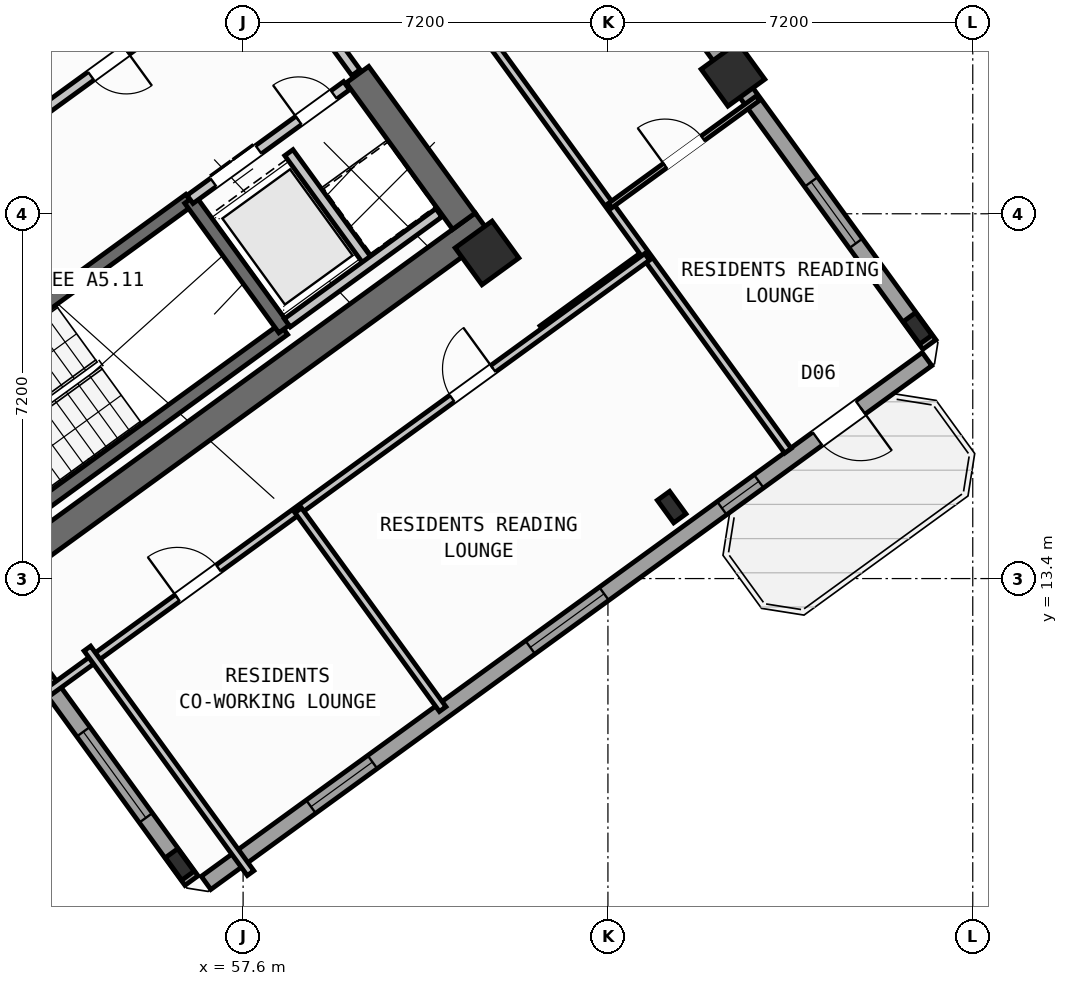
"""IFC4 building model, lengths in metres.
Left out: names, types, materials, properties, quantities, classifications, styles, units other than length and angle.
Written with IfcOpenShell. Run it as: python <this file> out.ifc"""

import sys

from ifc_helpers import new_model, si_unit, direction, frame, frame_2d, origin, origin_2d, place, context, subcontext, project, spatial, rectangle, hollow_rectangle, i_section, extrude, source, transform, mapped, element, fill, save


model = new_model("IFC4")
c1 = context("Model", 3, precision=1e-05, world=origin(), true_north=direction((0.0, 1.0)))
c2 = subcontext(c1, "Body", "Model", "MODEL_VIEW")
j1 = project(units=[si_unit("LENGTHUNIT", "METRE"), si_unit("PLANEANGLEUNIT", "RADIAN")], contexts=[c1])
p1 = place(None, origin())
s1 = spatial("IfcSite", under=j1, at=p1, CompositionType="ELEMENT")
p2 = place(p1, origin())
s2 = spatial("IfcBuilding", under=s1, at=p2, CompositionType="ELEMENT")
p3 = place(p2, frame((0.0, 0.0, 158.7)))
s3 = spatial("IfcBuildingStorey", under=s2, at=p3, CompositionType="ELEMENT", Elevation=158.7)
p4 = place(p3, frame((52.359, 13.14, 0.0), z_axis=(0.0, 0.0, 1.0), x_axis=(0.809014896919, 0.587788139183, 0.0)))
e1 = element("IfcWall", 1, at=p4, inside=s3, PredefinedType="SHEAR", context=c2, shape_type="SweptSolid", body=[
    extrude(rectangle(XDim=12.34, YDim=0.55, at=frame_2d((6.17, 0.0))), origin(), (0.0, 0.0, 1.0), 3.35),
])
p5 = place(p3, frame((61.958, 20.454, 0.0), z_axis=(0.0, 0.0, 1.0), x_axis=(-0.587802113096, 0.809004744015, 0.0)))
e2 = element("IfcWall", 2, at=p5, inside=s3, PredefinedType="SHEAR", context=c2, shape_type="SweptSolid", body=[
    extrude(rectangle(XDim=3.575, YDim=0.55, at=frame_2d((1.788, 0.0))), origin(), (0.0, 0.0, 1.0), 3.35),
])
m1 = source(origin(), c2, "Body", "SweptSolid", [
    extrude(i_section(OverallWidth=0.3, OverallDepth=0.55, WebThickness=0.015, FlangeThickness=0.029, at=origin_2d()), origin(), (0.0, 0.0, 1.0), 3.6),
])
for number, where, z_axis, x_axis in (
    (3, (56.35, 7.758, 0.0), (0.0, 0.0, 1.0), (0.809, 0.588, 0.0)),
    (4, (66.058, 14.811, 0.0), (0.0, 0.0, 1.0), (0.809, 0.588, 0.0)),
):
    element("IfcColumn", number, at=place(p3, frame(where, z_axis=z_axis, x_axis=x_axis)), inside=s3, PredefinedType="COLUMN", context=c2, shape_type="MappedRepresentation", body=[
        mapped(m1, transform((0.0, 0.0, 0.0), scale=1.0)),
    ])
m2 = source(origin(), c2, "Body", "SweptSolid", [
    extrude(hollow_rectangle(XDim=0.9, YDim=0.9, WallThickness=0.036, at=origin_2d()), origin(), (0.0, 0.0, 1.0), 3.6),
])
p6 = place(p3, frame((62.414, 19.827, 0.0), z_axis=(0.0, 0.0, 1.0), x_axis=(0.809016994375, 0.587785252292, 0.0)))
e5 = element("IfcColumn", 5, at=p6, inside=s3, PredefinedType="COLUMN", context=c2, shape_type="MappedRepresentation", body=[
    mapped(m2, transform((0.0, 0.0, 0.0), scale=1.0)),
])
p7 = place(p3, frame((70.912, 18.338, 0.0), z_axis=(0.0, 0.0, 1.0), x_axis=(0.809016994375, 0.587785252292, 0.0)))
e6 = element("IfcColumn", 6, at=p7, inside=s3, PredefinedType="COLUMN", context=c2, shape_type="MappedRepresentation", body=[
    mapped(m1, transform((0.0, 0.0, 0.0), scale=1.0)),
])
p8 = place(p3, frame((67.268, 23.354, 0.0), z_axis=(0.0, 0.0, 1.0), x_axis=(0.809016994375, 0.587785252292, 0.0)))
e7 = element("IfcColumn", 7, at=p8, inside=s3, PredefinedType="COLUMN", context=c2, shape_type="MappedRepresentation", body=[
    mapped(m2, transform((0.0, 0.0, 0.0), scale=1.0)),
])
p9 = place(p3, frame((58.455, 35.484, 0.0), z_axis=(0.0, 0.0, 1.0), x_axis=(0.587783625747, -0.809018176127, 0.0)))
e8 = element("IfcWall", 8, at=p9, inside=s3, PredefinedType="STANDARD", context=c2, shape_type="SweptSolid", body=[
    extrude(rectangle(XDim=21.587, YDim=0.32, at=frame_2d((10.794, 0.0))), origin(), (0.0, 0.0, 1.0), 2.775),
])
p10 = place(p9, frame((1.504, 0.0, 0.85)))
e9 = element("IfcOpeningElement", 9, at=p10, cuts=e8, PredefinedType="OPENING", context=c2, shape_type="SweptSolid", body=[
    extrude(rectangle(XDim=1.8, YDim=1.5, at=frame_2d((0.9, 0.75))), frame((0.0, 0.17, 0.0), z_axis=(0.0, -1.0, 0.0), x_axis=(1.0, 0.0, 0.0)), (0.0, 0.0, 1.0), 0.34),
])
p11 = place(p9, frame((10.444, 0.0, 0.85)))
e10 = element("IfcOpeningElement", 10, at=p11, cuts=e8, PredefinedType="OPENING", context=c2, shape_type="SweptSolid", body=[
    extrude(rectangle(XDim=1.8, YDim=1.5, at=frame_2d((0.9, 0.75))), frame((0.0, 0.17, 0.0), z_axis=(0.0, -1.0, 0.0), x_axis=(1.0, 0.0, 0.0)), (0.0, 0.0, 1.0), 0.34),
])
p12 = place(p9, frame((17.62, 0.0, 0.85)))
e11 = element("IfcOpeningElement", 11, at=p12, cuts=e8, PredefinedType="OPENING", context=c2, shape_type="SweptSolid", body=[
    extrude(rectangle(XDim=1.5, YDim=1.5, at=frame_2d((0.75, 0.75))), frame((0.0, 0.17, 0.0), z_axis=(0.0, -1.0, 0.0), x_axis=(1.0, 0.0, 0.0)), (0.0, 0.0, 1.0), 0.34),
])
p13 = place(p3, frame((71.098, 17.731, 0.0), z_axis=(0.0, 0.0, 1.0), x_axis=(-0.809021120468, -0.587779573171, 0.0)))
e12 = element("IfcWall", 12, at=p13, inside=s3, PredefinedType="STANDARD", context=c2, shape_type="SweptSolid", body=[
    extrude(rectangle(XDim=17.588, YDim=0.32, at=frame_2d((8.794, 0.0))), origin(), (0.0, 0.0, 1.0), 3.35),
])
p14 = place(p13, frame((1.624, 0.0, 0.0)))
e13 = element("IfcOpeningElement", 13, at=p14, cuts=e12, PredefinedType="OPENING", context=c2, shape_type="SweptSolid", body=[
    extrude(rectangle(XDim=1.05, YDim=2.15, at=frame_2d((0.525, 1.075))), frame((0.0, 0.17, 0.0), z_axis=(0.0, -1.0, 0.0), x_axis=(1.0, 0.0, 0.0)), (0.0, 0.0, 1.0), 0.34),
])
p15 = place(p13, frame((4.104, 0.0, 1.0)))
e14 = element("IfcOpeningElement", 14, at=p15, cuts=e12, PredefinedType="OPENING", context=c2, shape_type="SweptSolid", body=[
    extrude(rectangle(XDim=0.9, YDim=1.25, at=frame_2d((0.45, 0.625))), frame((0.0, 0.17, 0.0), z_axis=(0.0, -1.0, 0.0), x_axis=(1.0, 0.0, 0.0)), (0.0, 0.0, 1.0), 0.34),
])
p16 = place(p13, frame((7.879, 0.0, 0.85)))
e15 = element("IfcOpeningElement", 15, at=p16, cuts=e12, PredefinedType="OPENING", context=c2, shape_type="SweptSolid", body=[
    extrude(rectangle(XDim=1.8, YDim=1.5, at=frame_2d((0.9, 0.75))), frame((0.0, 0.17, 0.0), z_axis=(0.0, -1.0, 0.0), x_axis=(1.0, 0.0, 0.0)), (0.0, 0.0, 1.0), 0.34),
])
p17 = place(p13, frame((13.529, 0.0, 0.85)))
e16 = element("IfcOpeningElement", 16, at=p17, cuts=e12, PredefinedType="OPENING", context=c2, shape_type="SweptSolid", body=[
    extrude(rectangle(XDim=1.5, YDim=1.5, at=frame_2d((0.75, 0.75))), frame((0.0, 0.17, 0.0), z_axis=(0.0, -1.0, 0.0), x_axis=(1.0, 0.0, 0.0)), (0.0, 0.0, 1.0), 0.34),
])
p18 = place(p3, frame((56.581, 7.439, 0.0), z_axis=(0.0, 0.0, 1.0), x_axis=(-0.587771678454, 0.809026856172, 0.0)))
e17 = element("IfcWall", 17, at=p18, inside=s3, PredefinedType="STANDARD", context=c2, shape_type="SweptSolid", body=[
    extrude(rectangle(XDim=6.824, YDim=0.32, at=frame_2d((3.412, 0.0))), origin(), (0.0, 0.0, 1.0), 2.775),
])
p19 = place(p18, frame((1.531, 0.0, 0.8)))
e18 = element("IfcOpeningElement", 18, at=p19, cuts=e17, PredefinedType="OPENING", context=c2, shape_type="SweptSolid", body=[
    extrude(rectangle(XDim=2.1, YDim=1.55, at=frame_2d((1.05, 0.775))), frame((0.0, 0.17, 0.0), z_axis=(0.0, -1.0, 0.0), x_axis=(1.0, 0.0, 0.0)), (0.0, 0.0, 1.0), 0.34),
])
p20 = place(p3, frame((49.863, 23.44, 0.0), z_axis=(0.0, 0.0, 1.0), x_axis=(0.809003474932, 0.587803859759, 0.0)))
e19 = element("IfcWall", 19, at=p20, inside=s3, PredefinedType="SHEAR", context=c2, shape_type="SweptSolid", body=[
    extrude(rectangle(XDim=7.46, YDim=0.26, at=frame_2d((3.73, 0.0))), origin(), (0.0, 0.0, 1.0), 3.35),
])
p21 = place(p20, frame((0.36, 0.0, 0.0)))
e20 = element("IfcOpeningElement", 20, at=p21, cuts=e19, PredefinedType="OPENING", context=c2, shape_type="SweptSolid", body=[
    extrude(rectangle(XDim=0.86, YDim=2.05, at=frame_2d((0.43, 1.025))), frame((0.0, 0.14, 0.0), z_axis=(0.0, -1.0, 0.0), x_axis=(1.0, 0.0, 0.0)), (0.0, 0.0, 1.0), 0.28),
])
p22 = place(p3, frame((52.472, 14.013, 0.0), z_axis=(0.0, 0.0, 1.0), x_axis=(0.809028366311, 0.587769599847, 0.0)))
e21 = element("IfcWall", 21, at=p22, inside=s3, PredefinedType="SHEAR", context=c2, shape_type="SweptSolid", body=[
    extrude(rectangle(XDim=7.33, YDim=0.26, at=frame_2d((3.665, 0.0))), origin(), (0.0, 0.0, 1.0), 3.35),
])
p23 = place(p3, frame((50.615, 16.57, 0.0), z_axis=(0.0, 0.0, 1.0), x_axis=(0.809028366311, 0.587769599847, 0.0)))
e22 = element("IfcWall", 22, at=p23, inside=s3, PredefinedType="SHEAR", context=c2, shape_type="SweptSolid", body=[
    extrude(rectangle(XDim=7.33, YDim=0.26, at=frame_2d((3.665, 0.0))), origin(), (0.0, 0.0, 1.0), 3.35),
])
p24 = place(p23, frame((0.22, 0.0, 0.0)))
e23 = element("IfcOpeningElement", 23, at=p24, cuts=e22, PredefinedType="OPENING", context=c2, shape_type="SweptSolid", body=[
    extrude(rectangle(XDim=1.1, YDim=2.1, at=frame_2d((0.55, 1.05))), frame((0.0, 0.14, 0.0), z_axis=(0.0, -1.0, 0.0), x_axis=(1.0, 0.0, 0.0)), (0.0, 0.0, 1.0), 0.28),
])
p25 = place(p3, frame((58.41, 18.327, 0.0), z_axis=(0.0, 0.0, 1.0), x_axis=(-0.58776738483, 0.809029975545, 0.0)))
e24 = element("IfcWall", 24, at=p25, inside=s3, PredefinedType="SHEAR", context=c2, shape_type="SweptSolid", body=[
    extrude(rectangle(XDim=3.16, YDim=0.26, at=frame_2d((1.58, 0.0))), origin(), (0.0, 0.0, 1.0), 3.35),
])
p26 = place(p3, frame((56.553, 20.884, 0.0), z_axis=(0.0, 0.0, 1.0), x_axis=(0.809023564264, 0.58777620951, 0.0)))
e25 = element("IfcWall", 25, at=p26, inside=s3, PredefinedType="STANDARD", context=c2, shape_type="SweptSolid", body=[
    extrude(rectangle(XDim=3.818, YDim=0.2, at=frame_2d((1.909, 0.0))), origin(), (0.0, 0.0, 1.0), 3.34),
])
p27 = place(p26, frame((0.57, 0.0, 0.0)))
e26 = element("IfcOpeningElement", 26, at=p27, cuts=e25, PredefinedType="OPENING", context=c2, shape_type="SweptSolid", body=[
    extrude(rectangle(XDim=1.1, YDim=2.15, at=frame_2d((0.55, 1.075))), frame((0.0, 0.11, 0.0), z_axis=(0.0, -1.0, 0.0), x_axis=(1.0, 0.0, 0.0)), (0.0, 0.0, 1.0), 0.22),
])
p28 = place(p26, frame((2.65, 0.0, 0.0)))
e27 = element("IfcOpeningElement", 27, at=p28, cuts=e25, PredefinedType="OPENING", context=c2, shape_type="SweptSolid", body=[
    extrude(rectangle(XDim=0.86, YDim=2.05, at=frame_2d((0.43, 1.025))), frame((0.0, 0.11, 0.0), z_axis=(0.0, -1.0, 0.0), x_axis=(1.0, 0.0, 0.0)), (0.0, 0.0, 1.0), 0.22),
])
p29 = place(p3, frame((60.067, 19.655, 0.0), z_axis=(0.0, 0.0, 1.0), x_axis=(-0.587800520745, 0.809005900975, 0.0)))
e28 = element("IfcWall", 28, at=p29, inside=s3, PredefinedType="STANDARD", context=c2, shape_type="SweptSolid", body=[
    extrude(rectangle(XDim=2.66, YDim=0.2, at=frame_2d((1.33, 0.0))), origin(), (0.0, 0.0, 1.0), 3.34),
])
p30 = place(p3, frame((58.472, 18.447, 0.0), z_axis=(0.0, 0.0, 1.0), x_axis=(0.809018631237, 0.587782999339, 0.0)))
e29 = element("IfcWall", 29, at=p30, inside=s3, PredefinedType="STANDARD", context=c2, shape_type="SweptSolid", body=[
    extrude(rectangle(XDim=3.698, YDim=0.2, at=frame_2d((1.849, 0.0))), origin(), (0.0, 0.0, 1.0), 3.34),
])
p31 = place(p3, frame((53.425, 22.468, 0.0), z_axis=(0.0, 0.0, 1.0), x_axis=(0.809024377198, 0.587775090574, 0.0)))
e30 = element("IfcWall", 30, at=p31, inside=s3, PredefinedType="STANDARD", context=c2, shape_type="SweptSolid", body=[
    extrude(rectangle(XDim=5.418, YDim=0.2, at=frame_2d((2.709, 0.0))), origin(), (0.0, 0.0, 1.0), 3.34),
])
p32 = place(p31, frame((4.28, 0.0, 0.0)))
e31 = element("IfcOpeningElement", 31, at=p32, cuts=e30, PredefinedType="OPENING", context=c2, shape_type="SweptSolid", body=[
    extrude(rectangle(XDim=0.86, YDim=2.05, at=frame_2d((0.43, 1.025))), frame((0.0, 0.11, 0.0), z_axis=(0.0, -1.0, 0.0), x_axis=(1.0, 0.0, 0.0)), (0.0, 0.0, 1.0), 0.22),
])
p33 = place(p31, frame((1.45, 0.0, 0.0)))
e32 = element("IfcOpeningElement", 32, at=p33, cuts=e30, PredefinedType="OPENING", context=c2, shape_type="SweptSolid", body=[
    extrude(rectangle(XDim=0.86, YDim=2.05, at=frame_2d((0.43, 1.025))), frame((0.0, 0.11, 0.0), z_axis=(0.0, -1.0, 0.0), x_axis=(1.0, 0.0, 0.0)), (0.0, 0.0, 1.0), 0.22),
])
p34 = place(p3, frame((59.827, 23.386, 0.0), z_axis=(0.0, 0.0, 1.0), x_axis=(-0.587803840107, 0.809003489211, 0.0)))
e33 = element("IfcWall", 33, at=p34, inside=s3, PredefinedType="STANDARD", context=c2, shape_type="SweptSolid", body=[
    extrude(rectangle(XDim=2.96, YDim=0.2, at=frame_2d((1.48, 0.0))), origin(), (0.0, 0.0, 1.0), 3.34),
])
p35 = place(p34, frame((1.68, 0.0, 0.0)))
e34 = element("IfcOpeningElement", 34, at=p35, cuts=e33, PredefinedType="OPENING", context=c2, shape_type="SweptSolid", body=[
    extrude(rectangle(XDim=1.0, YDim=2.1, at=frame_2d((0.5, 1.05))), frame((0.0, 0.11, 0.0), z_axis=(0.0, -1.0, 0.0), x_axis=(1.0, 0.0, 0.0)), (0.0, 0.0, 1.0), 0.22),
])
p36 = place(p3, frame((63.507, 18.322, 0.0), z_axis=(0.0, 0.0, 1.0), x_axis=(0.809034604122, 0.587761013791, 0.0)))
e35 = element("IfcWall", 35, at=p36, inside=s3, PredefinedType="PARTITIONING", context=c2, shape_type="SweptSolid", body=[
    extrude(rectangle(XDim=2.51, YDim=0.16, at=frame_2d((1.255, 0.0))), origin(), (0.0, 0.0, 1.0), 3.34),
])
p37 = place(p3, frame((68.353, 15.922, 0.0), z_axis=(0.0, 0.0, 1.0), x_axis=(-0.587782002009, 0.809019355834, 0.0)))
e36 = element("IfcWall", 36, at=p37, inside=s3, PredefinedType="PARTITIONING", context=c2, shape_type="SweptSolid", body=[
    extrude(rectangle(XDim=15.35, YDim=0.16, at=frame_2d((7.675, 0.0))), origin(), (0.0, 0.0, 1.0), 3.34),
])
p38 = place(p3, frame((64.839, 20.759, 0.0), z_axis=(0.0, 0.0, 1.0), x_axis=(0.809013833588, 0.587789602718, 0.0)))
e37 = element("IfcWall", 37, at=p38, inside=s3, PredefinedType="PARTITIONING", context=c2, shape_type="SweptSolid", body=[
    extrude(rectangle(XDim=3.61, YDim=0.11, at=frame_2d((1.805, 0.0))), origin(), (0.0, 0.0, 1.0), 3.34),
])
p39 = place(p38, frame((1.345, 0.0, 0.0)))
e38 = element("IfcOpeningElement", 38, at=p39, cuts=e37, PredefinedType="OPENING", context=c2, shape_type="SweptSolid", body=[
    extrude(rectangle(XDim=0.92, YDim=2.08, at=frame_2d((0.46, 1.04))), frame((0.0, 0.065, 0.0), z_axis=(0.0, -1.0, 0.0), x_axis=(1.0, 0.0, 0.0)), (0.0, 0.0, 1.0), 0.13),
])
p40 = place(p3, frame((53.705, 11.126, 0.0), z_axis=(0.0, 0.0, 1.0), x_axis=(0.809014504436, 0.587788679384, 0.0)))
e39 = element("IfcWall", 39, at=p40, inside=s3, PredefinedType="PARTITIONING", context=c2, shape_type="SweptSolid", body=[
    extrude(rectangle(XDim=14.67, YDim=0.16, at=frame_2d((7.335, 0.0))), origin(), (0.0, 0.0, 1.0), 3.34),
])
p41 = place(p40, frame((3.215, 0.0, 0.0)))
e40 = element("IfcOpeningElement", 40, at=p41, cuts=e39, PredefinedType="OPENING", context=c2, shape_type="SweptSolid", body=[
    extrude(rectangle(XDim=1.0, YDim=2.1, at=frame_2d((0.5, 1.05))), frame((0.0, 0.09, 0.0), z_axis=(0.0, -1.0, 0.0), x_axis=(1.0, 0.0, 0.0)), (0.0, 0.0, 1.0), 0.18),
])
p42 = place(p40, frame((9.915, 0.0, 0.0)))
e41 = element("IfcOpeningElement", 41, at=p42, cuts=e39, PredefinedType="OPENING", context=c2, shape_type="SweptSolid", body=[
    extrude(rectangle(XDim=1.0, YDim=2.1, at=frame_2d((0.5, 1.05))), frame((0.0, 0.09, 0.0), z_axis=(0.0, -1.0, 0.0), x_axis=(1.0, 0.0, 0.0)), (0.0, 0.0, 1.0), 0.18),
])
p43 = place(p3, frame((57.747, 7.586, 0.0), z_axis=(0.0, 0.0, 1.0), x_axis=(-0.587784893399, 0.809017255126, 0.0)))
e42 = element("IfcWall", 42, at=p43, inside=s3, PredefinedType="PARTITIONING", context=c2, shape_type="SweptSolid", body=[
    extrude(rectangle(XDim=5.48, YDim=0.16, at=frame_2d((2.74, 0.0))), origin(), (0.0, 0.0, 1.0), 3.34),
])
p44 = place(p3, frame((61.539, 10.823, 0.0), z_axis=(0.0, 0.0, 1.0), x_axis=(-0.587785532001, 0.809016791155, 0.0)))
e43 = element("IfcWall", 43, at=p44, inside=s3, PredefinedType="PARTITIONING", context=c2, shape_type="SweptSolid", body=[
    extrude(rectangle(XDim=4.85, YDim=0.16, at=frame_2d((2.425, 0.0))), origin(), (0.0, 0.0, 1.0), 3.34),
])
m3 = source(origin(), c2, "Body", "SweptSolid", [
    extrude(rectangle(XDim=1.05, YDim=2.15, at=frame_2d((0.525, 1.075))), frame((0.0, 0.025, 0.0), z_axis=(0.0, -1.0, 0.0), x_axis=(1.0, 0.0, 0.0)), (0.0, 0.0, 1.0), 0.05),
])
p45 = place(p14, origin())
e44 = element("IfcDoor", 44, at=p45, inside=s3, OperationType="SINGLE_SWING_LEFT", PredefinedType="DOOR", context=c2, shape_type="MappedRepresentation", body=[
    mapped(m3, transform((0.0, 0.0, 0.0), scale=1.0)),
])
fill(e13, e44)
m4 = source(origin(), c2, "Body", "SweptSolid", [
    extrude(rectangle(XDim=1.5, YDim=1.5, at=frame_2d((0.75, 0.75))), frame((0.0, 0.03, 0.0), z_axis=(0.0, -1.0, 0.0), x_axis=(1.0, 0.0, 0.0)), (0.0, 0.0, 1.0), 0.06),
])
p46 = place(p12, origin())
e45 = element("IfcWindow", 45, at=p46, inside=s3, PartitioningType="SINGLE_PANEL", PredefinedType="WINDOW", context=c2, shape_type="MappedRepresentation", body=[
    mapped(m4, transform((0.0, 0.0, 0.0), scale=1.0)),
])
fill(e11, e45)
m5 = source(origin(), c2, "Body", "SweptSolid", [
    extrude(rectangle(XDim=0.9, YDim=1.25, at=frame_2d((0.45, 0.625))), frame((0.0, 0.03, 0.0), z_axis=(0.0, -1.0, 0.0), x_axis=(1.0, 0.0, 0.0)), (0.0, 0.0, 1.0), 0.06),
])
p47 = place(p15, origin())
e46 = element("IfcWindow", 46, at=p47, inside=s3, PartitioningType="SINGLE_PANEL", PredefinedType="WINDOW", context=c2, shape_type="MappedRepresentation", body=[
    mapped(m5, transform((0.0, 0.0, 0.0), scale=1.0)),
])
fill(e14, e46)
m6 = source(origin(), c2, "Body", "SweptSolid", [
    extrude(rectangle(XDim=1.8, YDim=1.5, at=frame_2d((0.9, 0.75))), frame((0.0, 0.03, 0.0), z_axis=(0.0, -1.0, 0.0), x_axis=(1.0, 0.0, 0.0)), (0.0, 0.0, 1.0), 0.06),
])
p48 = place(p16, origin())
e47 = element("IfcWindow", 47, at=p48, inside=s3, PartitioningType="SINGLE_PANEL", PredefinedType="WINDOW", context=c2, shape_type="MappedRepresentation", body=[
    mapped(m6, transform((0.0, 0.0, 0.0), scale=1.0)),
])
fill(e15, e47)
p49 = place(p17, origin())
e48 = element("IfcWindow", 48, at=p49, inside=s3, PartitioningType="SINGLE_PANEL", PredefinedType="WINDOW", context=c2, shape_type="MappedRepresentation", body=[
    mapped(m4, transform((0.0, 0.0, 0.0), scale=1.0)),
])
fill(e16, e48)
m7 = source(origin(), c2, "Body", "SweptSolid", [
    extrude(rectangle(XDim=2.1, YDim=1.55, at=frame_2d((1.05, 0.775))), frame((0.0, 0.03, 0.0), z_axis=(0.0, -1.0, 0.0), x_axis=(1.0, 0.0, 0.0)), (0.0, 0.0, 1.0), 0.06),
])
p50 = place(p19, origin())
e49 = element("IfcWindow", 49, at=p50, inside=s3, PartitioningType="SINGLE_PANEL", PredefinedType="WINDOW", context=c2, shape_type="MappedRepresentation", body=[
    mapped(m7, transform((0.0, 0.0, 0.0), scale=1.0)),
])
fill(e18, e49)
m8 = source(origin(), c2, "Body", "SweptSolid", [
    extrude(rectangle(XDim=1.1, YDim=2.15, at=frame_2d((0.55, 1.075))), frame((0.0, 0.025, 0.0), z_axis=(0.0, -1.0, 0.0), x_axis=(1.0, 0.0, 0.0)), (0.0, 0.0, 1.0), 0.05),
])
p51 = place(p27, origin())
e50 = element("IfcDoor", 50, at=p51, inside=s3, OperationType="DOUBLE_DOOR_SLIDING", PredefinedType="DOOR", context=c2, shape_type="MappedRepresentation", body=[
    mapped(m8, transform((0.0, 0.0, 0.0), scale=1.0)),
])
fill(e26, e50)
m9 = source(origin(), c2, "Body", "SweptSolid", [
    extrude(rectangle(XDim=0.86, YDim=2.05, at=frame_2d((0.43, 1.025))), frame((0.0, 0.025, 0.0), z_axis=(0.0, -1.0, 0.0), x_axis=(1.0, 0.0, 0.0)), (0.0, 0.0, 1.0), 0.05),
])
p52 = place(p28, origin())
e51 = element("IfcDoor", 51, at=p52, inside=s3, OperationType="SINGLE_SWING_LEFT", PredefinedType="DOOR", context=c2, shape_type="MappedRepresentation", body=[
    mapped(m9, transform((0.0, 0.0, 0.0), scale=1.0)),
])
fill(e27, e51)
p53 = place(p33, frame((0.86, 0.0, 0.0), z_axis=(0.0, 0.0, 1.0), x_axis=(-1.0, 0.0, 0.0)))
e52 = element("IfcDoor", 52, at=p53, inside=s3, OperationType="SINGLE_SWING_LEFT", PredefinedType="DOOR", context=c2, shape_type="MappedRepresentation", body=[
    mapped(m9, transform((0.0, 0.0, 0.0), scale=1.0)),
])
fill(e32, e52)
m10 = source(origin(), c2, "Body", "SweptSolid", [
    extrude(rectangle(XDim=0.92, YDim=2.08, at=frame_2d((0.46, 1.04))), frame((0.0, 0.025, 0.0), z_axis=(0.0, -1.0, 0.0), x_axis=(1.0, 0.0, 0.0)), (0.0, 0.0, 1.0), 0.05),
])
p54 = place(p39, origin())
e53 = element("IfcDoor", 53, at=p54, inside=s3, OperationType="SINGLE_SWING_LEFT", PredefinedType="DOOR", context=c2, shape_type="MappedRepresentation", body=[
    mapped(m10, transform((0.0, 0.0, 0.0), scale=1.0)),
])
fill(e38, e53)
m11 = source(origin(), c2, "Body", "SweptSolid", [
    extrude(rectangle(XDim=1.0, YDim=2.1, at=frame_2d((0.5, 1.05))), frame((0.0, 0.025, 0.0), z_axis=(0.0, -1.0, 0.0), x_axis=(1.0, 0.0, 0.0)), (0.0, 0.0, 1.0), 0.05),
])
p55 = place(p41, origin())
e54 = element("IfcDoor", 54, at=p55, inside=s3, OperationType="SINGLE_SWING_LEFT", PredefinedType="DOOR", context=c2, shape_type="MappedRepresentation", body=[
    mapped(m11, transform((0.0, 0.0, 0.0), scale=1.0)),
])
fill(e40, e54)
p56 = place(p42, origin())
e55 = element("IfcDoor", 55, at=p56, inside=s3, OperationType="SINGLE_SWING_RIGHT", PredefinedType="DOOR", context=c2, shape_type="MappedRepresentation", body=[
    mapped(m11, transform((0.0, 0.0, 0.0), scale=1.0)),
])
fill(e41, e55)
save(model, sys.argv[1])
